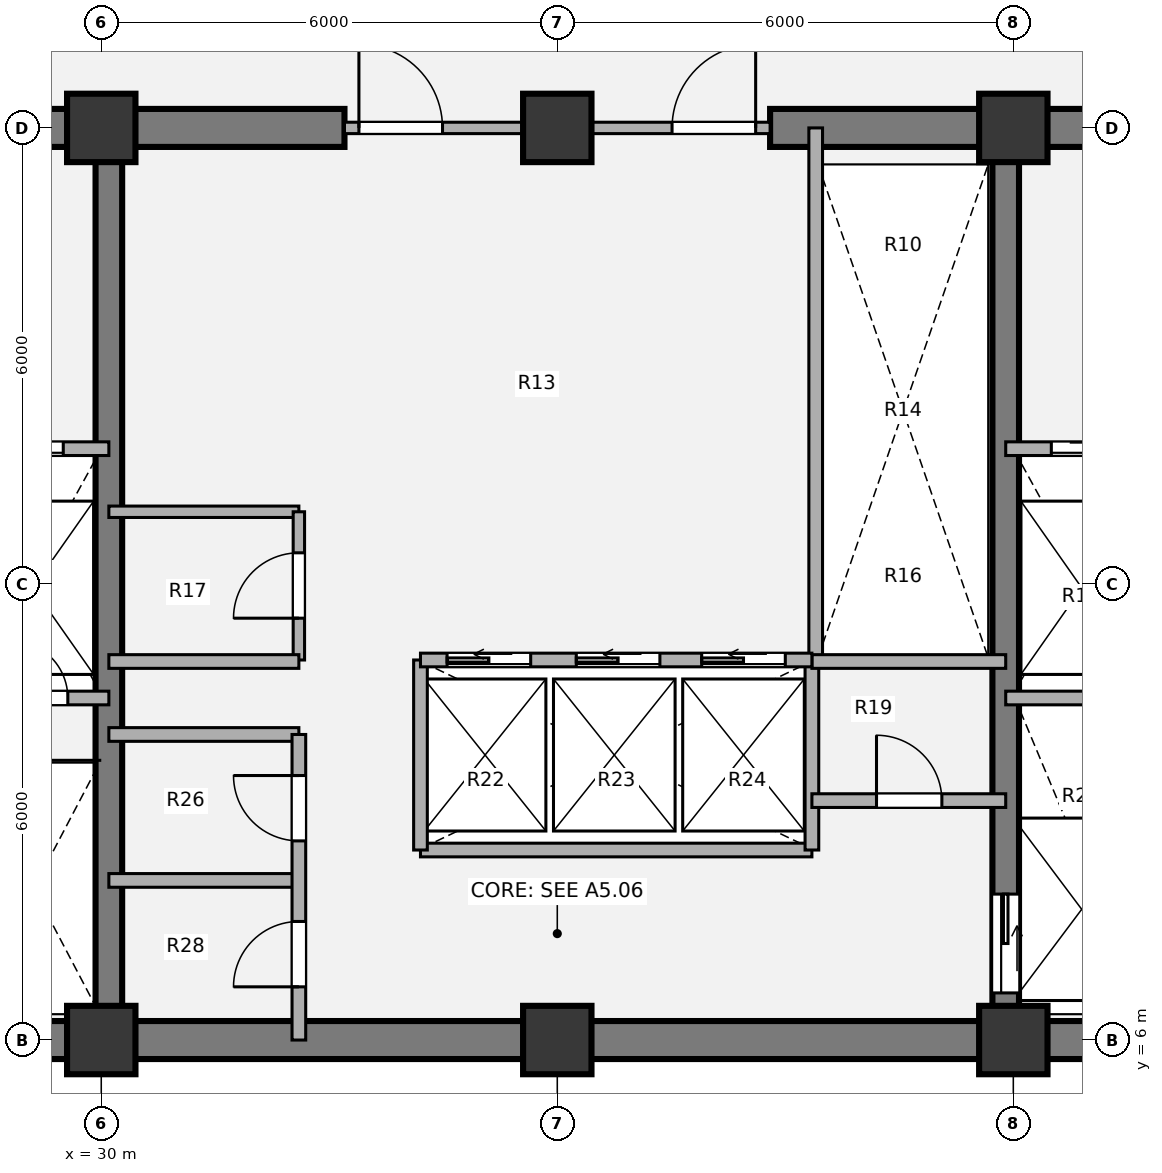
"""IFC4 building model, lengths in metres.
Left out: names, types, materials, properties, quantities, classifications, styles, units other than length and angle.
Written with IfcOpenShell. Run it as: python <this file> out.ifc"""

import sys

from ifc_helpers import new_model, si_unit, direction, frame, frame_2d, origin, origin_2d, place, context, subcontext, project, spatial, rectangle, extrude, source, transform, mapped, element, fill, save


model = new_model("IFC4")
c1 = context("Model", 3, precision=1e-05, world=origin(), true_north=direction((0.0, 1.0)))
c2 = subcontext(c1, "Body", "Model", "MODEL_VIEW")
j1 = project(units=[si_unit("LENGTHUNIT", "METRE"), si_unit("PLANEANGLEUNIT", "RADIAN")], contexts=[c1])
p1 = place(None, origin())
s1 = spatial("IfcSite", under=j1, at=p1, CompositionType="ELEMENT")
p2 = place(p1, origin())
s2 = spatial("IfcBuilding", under=s1, at=p2, CompositionType="ELEMENT")
p3 = place(p2, frame((0.0, 0.0, 116.28)))
s3 = spatial("IfcBuildingStorey", under=s2, at=p3, CompositionType="ELEMENT", Elevation=116.28)
m1 = source(origin(), c2, "Body", "SweptSolid", [
    extrude(rectangle(XDim=0.9, YDim=0.9, at=origin_2d()), origin(), (0.0, 0.0, 1.0), 3.78),
])
for number, where, z_axis, x_axis in (
    (1, (30.0, 6.0, 0.0), (0.0, 0.0, 1.0), (1.0, 0.0, 0.0)),
    (2, (36.0, 6.0, 0.0), (0.0, 0.0, 1.0), (1.0, 0.0, 0.0)),
    (3, (42.0, 6.0, 0.0), (0.0, 0.0, 1.0), (1.0, 0.0, 0.0)),
    (4, (30.0, 18.0, 0.0), (0.0, 0.0, 1.0), (1.0, 0.0, 0.0)),
    (5, (36.0, 18.0, 0.0), (0.0, 0.0, 1.0), (1.0, 0.0, 0.0)),
    (6, (42.0, 18.0, 0.0), (0.0, 0.0, 1.0), (1.0, 0.0, 0.0)),
):
    element("IfcColumn", number, at=place(p3, frame(where, z_axis=z_axis, x_axis=x_axis)), inside=s3, PredefinedType="COLUMN", context=c2, shape_type="MappedRepresentation", body=[
        mapped(m1, transform((0.0, 0.0, 0.0), x_axis=(1.0, 0.0, 0.0), y_axis=(0.0, 1.0, 0.0), z_axis=(0.0, 0.0, 1.0), scale=1.0)),
    ])
p4 = place(p3, frame((48.25, 6.0, 0.0), z_axis=(0.0, 0.0, 1.0), x_axis=(-1.0, 0.0, 0.0)))
e7 = element("IfcWall", 7, at=p4, inside=s3, PredefinedType="SHEAR", context=c2, shape_type="SweptSolid", body=[
    extrude(rectangle(XDim=24.5, YDim=0.5, at=frame_2d((12.25, 0.0))), origin(), (0.0, 0.0, 1.0), 3.78),
])
p5 = place(p3, frame((23.75, 18.0, 0.0), z_axis=(0.0, 0.0, 1.0), x_axis=(1.0, 0.0, 0.0)))
e8 = element("IfcWall", 8, at=p5, inside=s3, PredefinedType="SHEAR", context=c2, shape_type="SweptSolid", body=[
    extrude(rectangle(XDim=9.45, YDim=0.5, at=frame_2d((4.725, 0.0))), origin(), (0.0, 0.0, 1.0), 3.78),
])
p6 = place(p5, frame((2.95, 0.0, 0.0)))
e9 = element("IfcOpeningElement", 9, at=p6, cuts=e8, PredefinedType="OPENING", context=c2, shape_type="SweptSolid", body=[
    extrude(rectangle(XDim=1.1, YDim=2.1, at=origin_2d()), frame((0.55, 0.26, 1.05), z_axis=(0.0, -1.0, 0.0), x_axis=(1.0, 0.0, 0.0)), (0.0, 0.0, 1.0), 0.52),
])
p7 = place(p3, frame((38.8, 18.0, 0.0), z_axis=(0.0, 0.0, 1.0), x_axis=(1.0, 0.0, 0.0)))
e10 = element("IfcWall", 10, at=p7, inside=s3, PredefinedType="SHEAR", context=c2, shape_type="SweptSolid", body=[
    extrude(rectangle(XDim=9.45, YDim=0.5, at=frame_2d((4.725, 0.0))), origin(), (0.0, 0.0, 1.0), 3.78),
])
p8 = place(p7, frame((5.45, 0.0, 0.0)))
e11 = element("IfcOpeningElement", 11, at=p8, cuts=e10, PredefinedType="OPENING", context=c2, shape_type="SweptSolid", body=[
    extrude(rectangle(XDim=1.1, YDim=2.1, at=origin_2d()), frame((0.55, 0.26, 1.05), z_axis=(0.0, -1.0, 0.0), x_axis=(1.0, 0.0, 0.0)), (0.0, 0.0, 1.0), 0.52),
])
p9 = place(p3, frame((30.1, 6.0, 0.0), z_axis=(0.0, 0.0, 1.0), x_axis=(0.0, 1.0, 0.0)))
e12 = element("IfcWall", 12, at=p9, inside=s3, PredefinedType="SHEAR", context=c2, shape_type="SweptSolid", body=[
    extrude(rectangle(XDim=12.0, YDim=0.35, at=frame_2d((6.0, 0.0))), origin(), (0.0, 0.0, 1.0), 3.78),
])
p10 = place(p3, frame((41.9, 18.0, 0.0), z_axis=(0.0, 0.0, 1.0), x_axis=(0.0, -1.0, 0.0)))
e13 = element("IfcWall", 13, at=p10, inside=s3, PredefinedType="SHEAR", context=c2, shape_type="SweptSolid", body=[
    extrude(rectangle(XDim=12.0, YDim=0.35, at=frame_2d((6.0, 0.0))), origin(), (0.0, 0.0, 1.0), 3.78),
])
p11 = place(p10, frame((10.08, 0.0, 0.0)))
e14 = element("IfcOpeningElement", 14, at=p11, cuts=e13, PredefinedType="OPENING", context=c2, shape_type="SweptSolid", body=[
    extrude(rectangle(XDim=1.3, YDim=2.1, at=origin_2d()), frame((0.65, 0.185, 1.05), z_axis=(0.0, -1.0, 0.0), x_axis=(1.0, 0.0, 0.0)), (0.0, 0.0, 1.0), 0.37),
])
p12 = place(p3, frame((30.1, 12.95, 0.0), z_axis=(0.0, 0.0, 1.0), x_axis=(1.0, 0.0, 0.0)))
e15 = element("IfcWall", 15, at=p12, inside=s3, PredefinedType="PARTITIONING", context=c2, shape_type="SweptSolid", body=[
    extrude(rectangle(XDim=2.5, YDim=0.15, at=frame_2d((1.25, 0.0))), origin(), (0.0, 0.0, 1.0), 3.5),
])
p13 = place(p3, frame((32.6, 11.0, 0.0), z_axis=(0.0, 0.0, 1.0), x_axis=(0.0, 1.0, 0.0)))
e16 = element("IfcWall", 16, at=p13, inside=s3, PredefinedType="PARTITIONING", context=c2, shape_type="SweptSolid", body=[
    extrude(rectangle(XDim=1.95, YDim=0.15, at=frame_2d((0.975, 0.0))), origin(), (0.0, 0.0, 1.0), 3.5),
])
p14 = place(p13, frame((0.55, 0.0, 0.0)))
e17 = element("IfcOpeningElement", 17, at=p14, cuts=e16, PredefinedType="OPENING", context=c2, shape_type="SweptSolid", body=[
    extrude(rectangle(XDim=0.86, YDim=2.1, at=origin_2d()), frame((0.43, 0.085, 1.05), z_axis=(0.0, -1.0, 0.0), x_axis=(1.0, 0.0, 0.0)), (0.0, 0.0, 1.0), 0.17),
])
p15 = place(p3, frame((34.2, 8.5, 0.0), z_axis=(0.0, 0.0, 1.0), x_axis=(1.0, 0.0, 0.0)))
e18 = element("IfcWall", 18, at=p15, inside=s3, PredefinedType="PARTITIONING", context=c2, shape_type="SweptSolid", body=[
    extrude(rectangle(XDim=5.15, YDim=0.18, at=frame_2d((2.575, 0.0))), origin(), (0.0, 0.0, 1.0), 3.5),
])
for number, where, z_axis, x_axis in (
    (19, (34.2, 8.5, 0.0), (0.0, 0.0, 1.0), (0.0, 1.0, 0.0)),
    (20, (39.35, 8.5, 0.0), (0.0, 0.0, 1.0), (0.0, 1.0, 0.0)),
):
    element("IfcWall", number, at=place(p3, frame(where, z_axis=z_axis, x_axis=x_axis)), inside=s3, PredefinedType="PARTITIONING", context=c2, shape_type="SweptSolid", body=[
        extrude(rectangle(XDim=2.5, YDim=0.18, at=frame_2d((1.25, 0.0))), origin(), (0.0, 0.0, 1.0), 3.5),
    ])
p16 = place(p3, frame((39.4, 11.0, 0.0), z_axis=(0.0, 0.0, 1.0), x_axis=(0.0, 1.0, 0.0)))
e21 = element("IfcWall", 21, at=p16, inside=s3, PredefinedType="PARTITIONING", context=c2, shape_type="SweptSolid", body=[
    extrude(rectangle(XDim=7.0, YDim=0.18, at=frame_2d((3.5, 0.0))), origin(), (0.0, 0.0, 1.0), 3.5),
])
p17 = place(p3, frame((30.1, 10.98, 0.0), z_axis=(0.0, 0.0, 1.0), x_axis=(1.0, 0.0, 0.0)))
e22 = element("IfcWall", 22, at=p17, inside=s3, PredefinedType="PARTITIONING", context=c2, shape_type="SweptSolid", body=[
    extrude(rectangle(XDim=2.5, YDim=0.18, at=frame_2d((1.25, 0.0))), origin(), (0.0, 0.0, 1.0), 3.5),
])
p18 = place(p3, frame((39.35, 10.98, 0.0), z_axis=(0.0, 0.0, 1.0), x_axis=(1.0, 0.0, 0.0)))
e23 = element("IfcWall", 23, at=p18, inside=s3, PredefinedType="PARTITIONING", context=c2, shape_type="SweptSolid", body=[
    extrude(rectangle(XDim=2.55, YDim=0.18, at=frame_2d((1.275, 0.0))), origin(), (0.0, 0.0, 1.0), 3.5),
])
for number, where, z_axis, x_axis in (
    (24, (30.1, 8.1, 0.0), (0.0, 0.0, 1.0), (1.0, 0.0, 0.0)),
    (25, (30.1, 10.02, 0.0), (0.0, 0.0, 1.0), (1.0, 0.0, 0.0)),
):
    element("IfcWall", number, at=place(p3, frame(where, z_axis=z_axis, x_axis=x_axis)), inside=s3, PredefinedType="PARTITIONING", context=c2, shape_type="SweptSolid", body=[
        extrude(rectangle(XDim=2.5, YDim=0.18, at=frame_2d((1.25, 0.0))), origin(), (0.0, 0.0, 1.0), 3.5),
    ])
p19 = place(p3, frame((32.6, 6.0, 0.0), z_axis=(0.0, 0.0, 1.0), x_axis=(0.0, 1.0, 0.0)))
e26 = element("IfcWall", 26, at=p19, inside=s3, PredefinedType="PARTITIONING", context=c2, shape_type="SweptSolid", body=[
    extrude(rectangle(XDim=4.02, YDim=0.18, at=frame_2d((2.01, 0.0))), origin(), (0.0, 0.0, 1.0), 3.5),
])
p20 = place(p19, frame((0.7, 0.0, 0.0)))
e27 = element("IfcOpeningElement", 27, at=p20, cuts=e26, PredefinedType="OPENING", context=c2, shape_type="SweptSolid", body=[
    extrude(rectangle(XDim=0.86, YDim=2.1, at=origin_2d()), frame((0.43, 0.1, 1.05), z_axis=(0.0, -1.0, 0.0), x_axis=(1.0, 0.0, 0.0)), (0.0, 0.0, 1.0), 0.2),
])
p21 = place(p19, frame((2.62, 0.0, 0.0)))
e28 = element("IfcOpeningElement", 28, at=p21, cuts=e26, PredefinedType="OPENING", context=c2, shape_type="SweptSolid", body=[
    extrude(rectangle(XDim=0.86, YDim=2.1, at=origin_2d()), frame((0.43, 0.1, 1.05), z_axis=(0.0, -1.0, 0.0), x_axis=(1.0, 0.0, 0.0)), (0.0, 0.0, 1.0), 0.2),
])
p22 = place(p3, frame((39.35, 9.15, 0.0), z_axis=(0.0, 0.0, 1.0), x_axis=(1.0, 0.0, 0.0)))
e29 = element("IfcWall", 29, at=p22, inside=s3, PredefinedType="PARTITIONING", context=c2, shape_type="SweptSolid", body=[
    extrude(rectangle(XDim=2.55, YDim=0.18, at=frame_2d((1.275, 0.0))), origin(), (0.0, 0.0, 1.0), 3.5),
])
p23 = place(p22, frame((0.85, 0.0, 0.0)))
e30 = element("IfcOpeningElement", 30, at=p23, cuts=e29, PredefinedType="OPENING", context=c2, shape_type="SweptSolid", body=[
    extrude(rectangle(XDim=0.86, YDim=2.1, at=origin_2d()), frame((0.43, 0.1, 1.05), z_axis=(0.0, -1.0, 0.0), x_axis=(1.0, 0.0, 0.0)), (0.0, 0.0, 1.0), 0.2),
])
p24 = place(p3, frame((33.2, 18.0, 0.0), z_axis=(0.0, 0.0, 1.0), x_axis=(1.0, 0.0, 0.0)))
e31 = element("IfcWall", 31, at=p24, inside=s3, PredefinedType="PARTITIONING", context=c2, shape_type="SweptSolid", body=[
    extrude(rectangle(XDim=5.6, YDim=0.15, at=frame_2d((2.8, 0.0))), origin(), (0.0, 0.0, 1.0), 2.315),
])
p25 = place(p24, frame((0.19, 0.0, 0.0)))
e32 = element("IfcOpeningElement", 32, at=p25, cuts=e31, PredefinedType="OPENING", context=c2, shape_type="SweptSolid", body=[
    extrude(rectangle(XDim=1.1, YDim=2.1, at=origin_2d()), frame((0.55, 0.085, 1.05), z_axis=(0.0, -1.0, 0.0), x_axis=(1.0, 0.0, 0.0)), (0.0, 0.0, 1.0), 0.17),
])
p26 = place(p24, frame((4.31, 0.0, 0.0)))
e33 = element("IfcOpeningElement", 33, at=p26, cuts=e31, PredefinedType="OPENING", context=c2, shape_type="SweptSolid", body=[
    extrude(rectangle(XDim=1.1, YDim=2.1, at=origin_2d()), frame((0.55, 0.085, 1.05), z_axis=(0.0, -1.0, 0.0), x_axis=(1.0, 0.0, 0.0)), (0.0, 0.0, 1.0), 0.17),
])
p27 = place(p3, frame((24.0, 13.78, 0.0), z_axis=(0.0, 0.0, 1.0), x_axis=(1.0, 0.0, 0.0)))
e34 = element("IfcWall", 34, at=p27, inside=s3, PredefinedType="PARTITIONING", context=c2, shape_type="SweptSolid", body=[
    extrude(rectangle(XDim=6.1, YDim=0.18, at=frame_2d((3.05, 0.0))), origin(), (0.0, 0.0, 1.0), 3.5),
])
p28 = place(p27, frame((1.15, 0.0, 0.0)))
e35 = element("IfcOpeningElement", 35, at=p28, cuts=e34, PredefinedType="OPENING", context=c2, shape_type="SweptSolid", body=[
    extrude(rectangle(XDim=1.1, YDim=2.1, at=origin_2d()), frame((0.55, 0.1, 1.05), z_axis=(0.0, -1.0, 0.0), x_axis=(1.0, 0.0, 0.0)), (0.0, 0.0, 1.0), 0.2),
])
p29 = place(p27, frame((4.4, 0.0, 0.0)))
e36 = element("IfcOpeningElement", 36, at=p29, cuts=e34, PredefinedType="OPENING", context=c2, shape_type="SweptSolid", body=[
    extrude(rectangle(XDim=1.1, YDim=2.1, at=origin_2d()), frame((0.55, 0.1, 1.05), z_axis=(0.0, -1.0, 0.0), x_axis=(1.0, 0.0, 0.0)), (0.0, 0.0, 1.0), 0.2),
])
p30 = place(p3, frame((28.15, 10.5, 0.0), z_axis=(0.0, 0.0, 1.0), x_axis=(1.0, 0.0, 0.0)))
e37 = element("IfcWall", 37, at=p30, inside=s3, PredefinedType="PARTITIONING", context=c2, shape_type="SweptSolid", body=[
    extrude(rectangle(XDim=1.95, YDim=0.18, at=frame_2d((0.975, 0.0))), origin(), (0.0, 0.0, 1.0), 3.5),
])
p31 = place(p30, frame((0.65, 0.0, 0.0)))
e38 = element("IfcOpeningElement", 38, at=p31, cuts=e37, PredefinedType="OPENING", context=c2, shape_type="SweptSolid", body=[
    extrude(rectangle(XDim=0.76, YDim=2.05, at=origin_2d()), frame((0.38, 0.1, 1.025), z_axis=(0.0, -1.0, 0.0), x_axis=(1.0, 0.0, 0.0)), (0.0, 0.0, 1.0), 0.2),
])
p32 = place(p3, frame((41.9, 13.78, 0.0), z_axis=(0.0, 0.0, 1.0), x_axis=(1.0, 0.0, 0.0)))
e39 = element("IfcWall", 39, at=p32, inside=s3, PredefinedType="PARTITIONING", context=c2, shape_type="SweptSolid", body=[
    extrude(rectangle(XDim=6.1, YDim=0.18, at=frame_2d((3.05, 0.0))), origin(), (0.0, 0.0, 1.0), 3.5),
])
p33 = place(p32, frame((0.6, 0.0, 0.0)))
e40 = element("IfcOpeningElement", 40, at=p33, cuts=e39, PredefinedType="OPENING", context=c2, shape_type="SweptSolid", body=[
    extrude(rectangle(XDim=1.1, YDim=2.1, at=origin_2d()), frame((0.55, 0.1, 1.05), z_axis=(0.0, -1.0, 0.0), x_axis=(1.0, 0.0, 0.0)), (0.0, 0.0, 1.0), 0.2),
])
p34 = place(p32, frame((3.8, 0.0, 0.0)))
e41 = element("IfcOpeningElement", 41, at=p34, cuts=e39, PredefinedType="OPENING", context=c2, shape_type="SweptSolid", body=[
    extrude(rectangle(XDim=1.1, YDim=2.1, at=origin_2d()), frame((0.55, 0.1, 1.05), z_axis=(0.0, -1.0, 0.0), x_axis=(1.0, 0.0, 0.0)), (0.0, 0.0, 1.0), 0.2),
])
p35 = place(p3, frame((41.9, 10.5, 0.0), z_axis=(0.0, 0.0, 1.0), x_axis=(1.0, 0.0, 0.0)))
e42 = element("IfcWall", 42, at=p35, inside=s3, PredefinedType="PARTITIONING", context=c2, shape_type="SweptSolid", body=[
    extrude(rectangle(XDim=1.95, YDim=0.18, at=frame_2d((0.975, 0.0))), origin(), (0.0, 0.0, 1.0), 3.5),
])
p36 = place(p3, frame((34.2, 11.0, 0.0), z_axis=(0.0, 0.0, 1.0), x_axis=(1.0, 0.0, 0.0)))
e43 = element("IfcWall", 43, at=p36, inside=s3, PredefinedType="PARTITIONING", context=c2, shape_type="SweptSolid", body=[
    extrude(rectangle(XDim=5.15, YDim=0.18, at=frame_2d((2.575, 0.0))), origin(), (0.0, 0.0, 1.0), 3.5),
])
p37 = place(p36, frame((0.35, 0.0, 0.0)))
e44 = element("IfcOpeningElement", 44, at=p37, cuts=e43, PredefinedType="OPENING", context=c2, shape_type="SweptSolid", body=[
    extrude(rectangle(XDim=1.1, YDim=2.1, at=origin_2d()), frame((0.55, 0.1, 1.05), z_axis=(0.0, -1.0, 0.0), x_axis=(1.0, 0.0, 0.0)), (0.0, 0.0, 1.0), 0.2),
])
p38 = place(p36, frame((2.05, 0.0, 0.0)))
e45 = element("IfcOpeningElement", 45, at=p38, cuts=e43, PredefinedType="OPENING", context=c2, shape_type="SweptSolid", body=[
    extrude(rectangle(XDim=1.1, YDim=2.1, at=origin_2d()), frame((0.55, 0.1, 1.05), z_axis=(0.0, -1.0, 0.0), x_axis=(1.0, 0.0, 0.0)), (0.0, 0.0, 1.0), 0.2),
])
p39 = place(p36, frame((3.7, 0.0, 0.0)))
e46 = element("IfcOpeningElement", 46, at=p39, cuts=e43, PredefinedType="OPENING", context=c2, shape_type="SweptSolid", body=[
    extrude(rectangle(XDim=1.1, YDim=2.1, at=origin_2d()), frame((0.55, 0.1, 1.05), z_axis=(0.0, -1.0, 0.0), x_axis=(1.0, 0.0, 0.0)), (0.0, 0.0, 1.0), 0.2),
])
m2 = source(origin(), c2, "Body", "SweptSolid", [
    extrude(rectangle(XDim=0.86, YDim=2.1, at=origin_2d()), frame((0.43, 0.025, 1.05), z_axis=(0.0, -1.0, 0.0), x_axis=(1.0, 0.0, 0.0)), (0.0, 0.0, 1.0), 0.05),
])
p40 = place(p14, origin())
e47 = element("IfcDoor", 47, at=p40, inside=s3, OperationType="SINGLE_SWING_LEFT", PredefinedType="DOOR", context=c2, shape_type="MappedRepresentation", body=[
    mapped(m2, transform((0.0, 0.0, 0.0), x_axis=(1.0, 0.0, 0.0), y_axis=(0.0, 1.0, 0.0), z_axis=(0.0, 0.0, 1.0), scale=1.0)),
])
fill(e17, e47)
p41 = place(p20, origin())
e48 = element("IfcDoor", 48, at=p41, inside=s3, OperationType="SINGLE_SWING_LEFT", PredefinedType="DOOR", context=c2, shape_type="MappedRepresentation", body=[
    mapped(m2, transform((0.0, 0.0, 0.0), x_axis=(1.0, 0.0, 0.0), y_axis=(0.0, 1.0, 0.0), z_axis=(0.0, 0.0, 1.0), scale=1.0)),
])
fill(e27, e48)
p42 = place(p21, origin())
e49 = element("IfcDoor", 49, at=p42, inside=s3, OperationType="SINGLE_SWING_RIGHT", PredefinedType="DOOR", context=c2, shape_type="MappedRepresentation", body=[
    mapped(m2, transform((0.0, 0.0, 0.0), x_axis=(1.0, 0.0, 0.0), y_axis=(0.0, 1.0, 0.0), z_axis=(0.0, 0.0, 1.0), scale=1.0)),
])
fill(e28, e49)
p43 = place(p23, origin())
e50 = element("IfcDoor", 50, at=p43, inside=s3, OperationType="SINGLE_SWING_LEFT", PredefinedType="DOOR", context=c2, shape_type="MappedRepresentation", body=[
    mapped(m2, transform((0.0, 0.0, 0.0), x_axis=(1.0, 0.0, 0.0), y_axis=(0.0, 1.0, 0.0), z_axis=(0.0, 0.0, 1.0), scale=1.0)),
])
fill(e30, e50)
m3 = source(origin(), c2, "Body", "SweptSolid", [
    extrude(rectangle(XDim=1.1, YDim=2.1, at=origin_2d()), frame((0.55, 0.025, 1.05), z_axis=(0.0, -1.0, 0.0), x_axis=(1.0, 0.0, 0.0)), (0.0, 0.0, 1.0), 0.05),
])
p44 = place(p25, origin())
e51 = element("IfcDoor", 51, at=p44, inside=s3, OperationType="SINGLE_SWING_LEFT", PredefinedType="DOOR", context=c2, shape_type="MappedRepresentation", body=[
    mapped(m3, transform((0.0, 0.0, 0.0), x_axis=(1.0, 0.0, 0.0), y_axis=(0.0, 1.0, 0.0), z_axis=(0.0, 0.0, 1.0), scale=1.0)),
])
fill(e32, e51)
p45 = place(p26, origin())
e52 = element("IfcDoor", 52, at=p45, inside=s3, OperationType="SINGLE_SWING_RIGHT", PredefinedType="DOOR", context=c2, shape_type="MappedRepresentation", body=[
    mapped(m3, transform((0.0, 0.0, 0.0), x_axis=(1.0, 0.0, 0.0), y_axis=(0.0, 1.0, 0.0), z_axis=(0.0, 0.0, 1.0), scale=1.0)),
])
fill(e33, e52)
m4 = source(origin(), c2, "Body", "SweptSolid", [
    extrude(rectangle(XDim=1.1, YDim=2.1, at=origin_2d()), frame((0.55, 0.025, 1.05), z_axis=(0.0, -1.0, 0.0), x_axis=(1.0, 0.0, 0.0)), (0.0, 0.0, 1.0), 0.05),
])
p46 = place(p29, origin())
e53 = element("IfcDoor", 53, at=p46, inside=s3, OperationType="SLIDING_TO_LEFT", PredefinedType="DOOR", context=c2, shape_type="MappedRepresentation", body=[
    mapped(m4, transform((0.0, 0.0, 0.0), x_axis=(1.0, 0.0, 0.0), y_axis=(0.0, 1.0, 0.0), z_axis=(0.0, 0.0, 1.0), scale=1.0)),
])
fill(e36, e53)
m5 = source(origin(), c2, "Body", "SweptSolid", [
    extrude(rectangle(XDim=0.76, YDim=2.05, at=origin_2d()), frame((0.38, 0.025, 1.025), z_axis=(0.0, -1.0, 0.0), x_axis=(1.0, 0.0, 0.0)), (0.0, 0.0, 1.0), 0.05),
])
p47 = place(p31, origin())
e54 = element("IfcDoor", 54, at=p47, inside=s3, OperationType="SINGLE_SWING_LEFT", PredefinedType="DOOR", context=c2, shape_type="MappedRepresentation", body=[
    mapped(m5, transform((0.0, 0.0, 0.0), x_axis=(1.0, 0.0, 0.0), y_axis=(0.0, 1.0, 0.0), z_axis=(0.0, 0.0, 1.0), scale=1.0)),
])
fill(e38, e54)
p48 = place(p33, origin())
e55 = element("IfcDoor", 55, at=p48, inside=s3, OperationType="SLIDING_TO_RIGHT", PredefinedType="DOOR", context=c2, shape_type="MappedRepresentation", body=[
    mapped(m4, transform((0.0, 0.0, 0.0), x_axis=(1.0, 0.0, 0.0), y_axis=(0.0, 1.0, 0.0), z_axis=(0.0, 0.0, 1.0), scale=1.0)),
])
fill(e40, e55)
m6 = source(origin(), c2, "Body", "SweptSolid", [
    extrude(rectangle(XDim=1.3, YDim=2.1, at=origin_2d()), frame((0.65, 0.025, 1.05), z_axis=(0.0, -1.0, 0.0), x_axis=(1.0, 0.0, 0.0)), (0.0, 0.0, 1.0), 0.05),
])
p49 = place(p11, origin())
e56 = element("IfcDoor", 56, at=p49, inside=s3, OperationType="SLIDING_TO_LEFT", PredefinedType="DOOR", context=c2, shape_type="MappedRepresentation", body=[
    mapped(m6, transform((0.0, 0.0, 0.0), x_axis=(1.0, 0.0, 0.0), y_axis=(0.0, 1.0, 0.0), z_axis=(0.0, 0.0, 1.0), scale=1.0)),
])
fill(e14, e56)
p50 = place(p37, origin())
e57 = element("IfcDoor", 57, at=p50, inside=s3, OperationType="SLIDING_TO_LEFT", PredefinedType="DOOR", context=c2, shape_type="MappedRepresentation", body=[
    mapped(m4, transform((0.0, 0.0, 0.0), x_axis=(1.0, 0.0, 0.0), y_axis=(0.0, 1.0, 0.0), z_axis=(0.0, 0.0, 1.0), scale=1.0)),
])
fill(e44, e57)
p51 = place(p38, origin())
e58 = element("IfcDoor", 58, at=p51, inside=s3, OperationType="SLIDING_TO_LEFT", PredefinedType="DOOR", context=c2, shape_type="MappedRepresentation", body=[
    mapped(m4, transform((0.0, 0.0, 0.0), x_axis=(1.0, 0.0, 0.0), y_axis=(0.0, 1.0, 0.0), z_axis=(0.0, 0.0, 1.0), scale=1.0)),
])
fill(e45, e58)
p52 = place(p39, origin())
e59 = element("IfcDoor", 59, at=p52, inside=s3, OperationType="SLIDING_TO_LEFT", PredefinedType="DOOR", context=c2, shape_type="MappedRepresentation", body=[
    mapped(m4, transform((0.0, 0.0, 0.0), x_axis=(1.0, 0.0, 0.0), y_axis=(0.0, 1.0, 0.0), z_axis=(0.0, 0.0, 1.0), scale=1.0)),
])
fill(e46, e59)
save(model, sys.argv[1])
